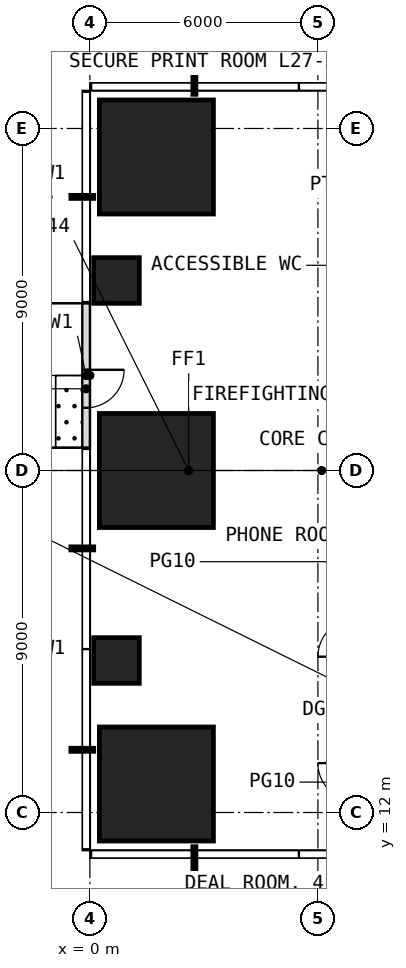
"""IFC4 building model, lengths in metres.
Left out: names, types, materials, properties, quantities, classifications, styles, units other than length and angle.
Written with IfcOpenShell. Run it as: python <this file> out.ifc"""

import sys

from ifc_helpers import new_model, si_unit, direction, frame, frame_2d, origin, origin_2d, place, context, subcontext, project, spatial, rectangle, extrude, element, fill, save


model = new_model("IFC4")
c1 = context("Model", 3, precision=1e-05, world=origin(), true_north=direction((0.0, 1.0)))
c2 = subcontext(c1, "Body", "Model", "MODEL_VIEW")
j1 = project(units=[si_unit("LENGTHUNIT", "METRE"), si_unit("PLANEANGLEUNIT", "RADIAN")], contexts=[c1])
p1 = place(None, origin())
s1 = spatial("IfcSite", under=j1, at=p1, CompositionType="ELEMENT")
p2 = place(p1, origin())
s2 = spatial("IfcBuilding", under=s1, at=p2, CompositionType="ELEMENT")
p3 = place(p2, frame((0.0, 0.0, 116.5)))
s3 = spatial("IfcBuildingStorey", under=s2, at=p3, CompositionType="ELEMENT", Elevation=116.5)
p4 = place(p3, frame((1.75, 12.75, 0.0), z_axis=(0.0, 0.0, 1.0), x_axis=(1.0, 0.0, 0.0)))
e1 = element("IfcColumn", 1, at=p4, inside=s3, PredefinedType="COLUMN", context=c2, shape_type="SweptSolid", body=[
    extrude(rectangle(XDim=3.0, YDim=3.0, at=origin_2d()), origin(), (0.0, 0.0, 1.0), 4.0),
])
p5 = place(p3, frame((0.7, 16.0, 0.0), z_axis=(0.0, 0.0, 1.0), x_axis=(1.0, 0.0, 0.0)))
e2 = element("IfcColumn", 2, at=p5, inside=s3, PredefinedType="COLUMN", context=c2, shape_type="SweptSolid", body=[
    extrude(rectangle(XDim=1.2, YDim=1.2, at=origin_2d()), origin(), (0.0, 0.0, 1.0), 4.0),
])
p6 = place(p3, frame((1.75, 21.0, 0.0), z_axis=(0.0, 0.0, 1.0), x_axis=(1.0, 0.0, 0.0)))
e3 = element("IfcColumn", 3, at=p6, inside=s3, PredefinedType="COLUMN", context=c2, shape_type="SweptSolid", body=[
    extrude(rectangle(XDim=3.0, YDim=3.0, at=origin_2d()), origin(), (0.0, 0.0, 1.0), 4.0),
])
p7 = place(p3, frame((0.7, 26.0, 0.0), z_axis=(0.0, 0.0, 1.0), x_axis=(1.0, 0.0, 0.0)))
e4 = element("IfcColumn", 4, at=p7, inside=s3, PredefinedType="COLUMN", context=c2, shape_type="SweptSolid", body=[
    extrude(rectangle(XDim=1.2, YDim=1.2, at=origin_2d()), origin(), (0.0, 0.0, 1.0), 4.0),
])
p8 = place(p3, frame((1.75, 29.25, 0.0), z_axis=(0.0, 0.0, 1.0), x_axis=(1.0, 0.0, 0.0)))
e5 = element("IfcColumn", 5, at=p8, inside=s3, PredefinedType="COLUMN", context=c2, shape_type="SweptSolid", body=[
    extrude(rectangle(XDim=3.0, YDim=3.0, at=origin_2d()), origin(), (0.0, 0.0, 1.0), 4.0),
])
p9 = place(p3, frame((-0.1, 25.4, 0.0), z_axis=(0.0, 0.0, 1.0), x_axis=(0.0, -1.0, 0.0)))
e6 = element("IfcWall", 6, at=p9, inside=s3, PredefinedType="USERDEFINED", context=c2, shape_type="SweptSolid", body=[
    extrude(rectangle(XDim=3.8, YDim=0.2, at=frame_2d((1.9, 0.0))), origin(), (0.0, 0.0, 1.0), 3.75),
])
p10 = place(p9, frame((1.75, 0.0, 0.0)))
e7 = element("IfcOpeningElement", 7, at=p10, cuts=e6, PredefinedType="OPENING", context=c2, shape_type="SweptSolid", body=[
    extrude(rectangle(XDim=1.0, YDim=2.4, at=frame_2d((0.5, 1.2))), frame((0.0, 0.11, 0.0), z_axis=(0.0, -1.0, 0.0), x_axis=(1.0, 0.0, 0.0)), (0.0, 0.0, 1.0), 0.22),
])
p11 = place(p10, origin())
e8 = element("IfcDoor", 8, at=p11, inside=s3, OperationType="SINGLE_SWING_LEFT", PredefinedType="DOOR", context=c2, shape_type="SweptSolid", body=[
    extrude(rectangle(XDim=1.0, YDim=2.4, at=frame_2d((0.5, 1.2))), frame((0.0, 0.025, 0.0), z_axis=(0.0, -1.0, 0.0), x_axis=(1.0, 0.0, 0.0)), (0.0, 0.0, 1.0), 0.05),
])
fill(e7, e8)
save(model, sys.argv[1])
